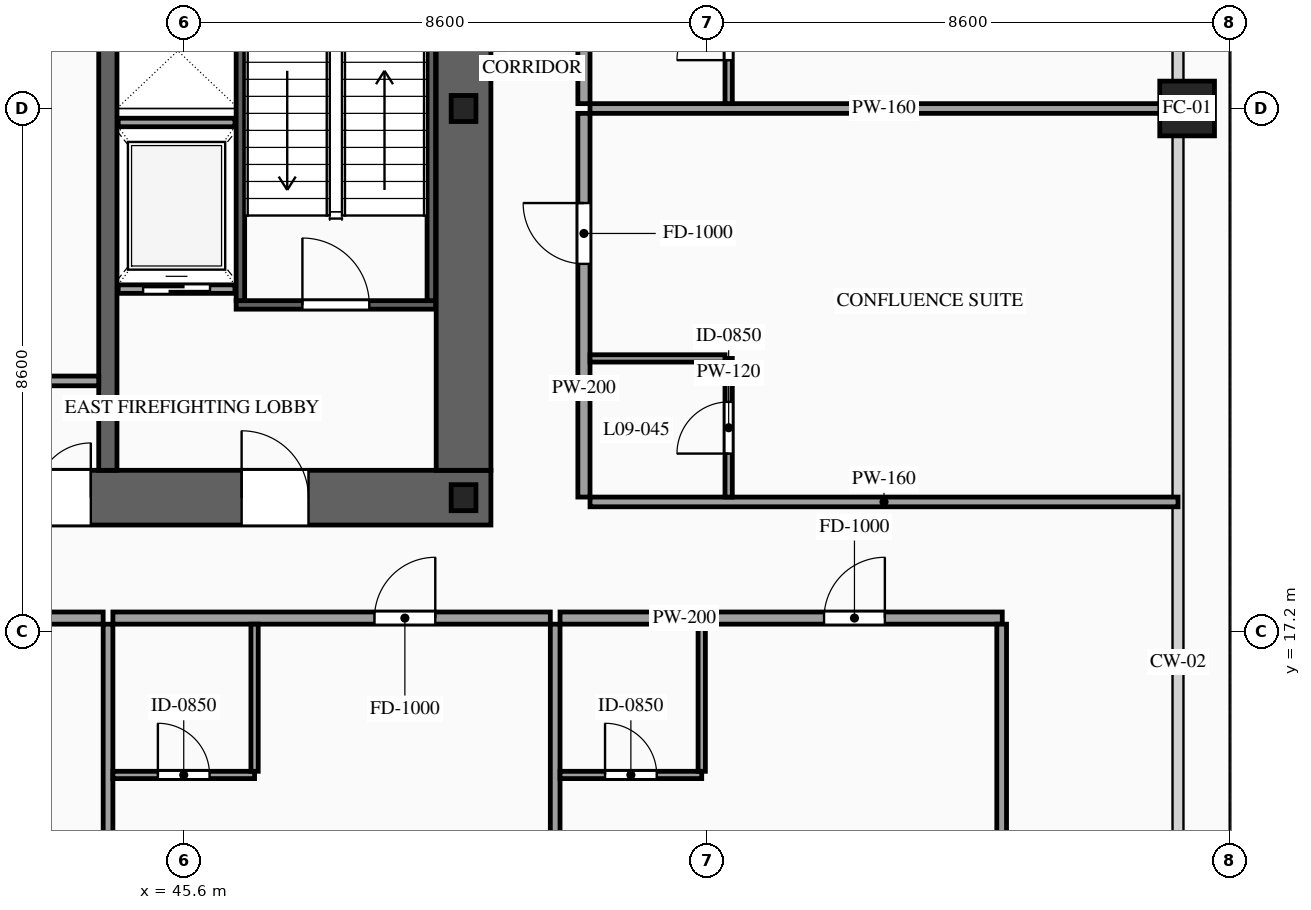
"""IFC4 building model, lengths in metres.
Left out: names, types, materials, properties, quantities, classifications, styles, units other than length and angle.
Written with IfcOpenShell. Run it as: python <this file> out.ifc"""

import sys

from ifc_helpers import new_model, si_unit, direction, frame, frame_2d, origin, origin_2d, place, context, subcontext, project, spatial, rectangle, hollow_rectangle, i_section, extrude, source, transform, mapped, element, fill, save


model = new_model("IFC4")
c1 = context("Model", 3, precision=1e-05, world=origin(), true_north=direction((0.0, 1.0)))
c2 = subcontext(c1, "Body", "Model", "MODEL_VIEW")
j1 = project(units=[si_unit("LENGTHUNIT", "METRE"), si_unit("PLANEANGLEUNIT", "RADIAN")], contexts=[c1])
p1 = place(None, origin())
s1 = spatial("IfcSite", under=j1, at=p1, CompositionType="ELEMENT")
p2 = place(p1, origin())
s2 = spatial("IfcBuilding", under=s1, at=p2, CompositionType="ELEMENT")
p3 = place(p2, frame((0.0, 0.0, 37.8)))
s3 = spatial("IfcBuildingStorey", under=s2, at=p3, CompositionType="ELEMENT", Elevation=37.8)
p4 = place(p3, frame((23.35, 19.4, 0.0), z_axis=(0.0, 0.0, 1.0), x_axis=(1.0, 0.0, 0.0)))
e1 = element("IfcWall", 1, at=p4, inside=s3, PredefinedType="SHEAR", context=c2, shape_type="SweptSolid", body=[
    extrude(rectangle(XDim=27.3, YDim=0.9, at=frame_2d((13.65, 0.0))), origin(), (0.0, 0.0, 1.0), 3.6),
])
p5 = place(p4, frame((2.1, 0.0, 0.0)))
e2 = element("IfcOpeningElement", 2, at=p5, cuts=e1, PredefinedType="OPENING", context=c2, shape_type="SweptSolid", body=[
    extrude(rectangle(XDim=1.1, YDim=2.2, at=frame_2d((0.55, 1.1))), frame((0.0, 0.465, 0.0), z_axis=(0.0, -1.0, 0.0), x_axis=(1.0, 0.0, 0.0)), (0.0, 0.0, 1.0), 0.93),
])
p6 = place(p4, frame((10.0, 0.0, 0.0)))
e3 = element("IfcOpeningElement", 3, at=p6, cuts=e1, PredefinedType="OPENING", context=c2, shape_type="SweptSolid", body=[
    extrude(rectangle(XDim=1.1, YDim=2.2, at=frame_2d((0.55, 1.1))), frame((0.0, 0.465, 0.0), z_axis=(0.0, -1.0, 0.0), x_axis=(1.0, 0.0, 0.0)), (0.0, 0.0, 1.0), 0.93),
])
p7 = place(p4, frame((23.2, 0.0, 0.0)))
e4 = element("IfcOpeningElement", 4, at=p7, cuts=e1, PredefinedType="OPENING", context=c2, shape_type="SweptSolid", body=[
    extrude(rectangle(XDim=1.1, YDim=2.2, at=frame_2d((0.55, 1.1))), frame((0.0, 0.465, 0.0), z_axis=(0.0, -1.0, 0.0), x_axis=(1.0, 0.0, 0.0)), (0.0, 0.0, 1.0), 0.93),
])
p8 = place(p4, frame((19.82, 0.0, 0.0)))
e5 = element("IfcOpeningElement", 5, at=p8, cuts=e1, PredefinedType="OPENING", context=c2, shape_type="SweptSolid", body=[
    extrude(rectangle(XDim=0.9, YDim=2.15, at=frame_2d((0.45, 1.075))), frame((0.0, 0.465, 0.0), z_axis=(0.0, -1.0, 0.0), x_axis=(1.0, 0.0, 0.0)), (0.0, 0.0, 1.0), 0.93),
])
p9 = place(p4, frame((18.38, 0.0, 0.0)))
e6 = element("IfcOpeningElement", 6, at=p9, cuts=e1, PredefinedType="OPENING", context=c2, shape_type="SweptSolid", body=[
    extrude(rectangle(XDim=0.9, YDim=2.15, at=frame_2d((0.45, 1.075))), frame((0.0, 0.465, 0.0), z_axis=(0.0, -1.0, 0.0), x_axis=(1.0, 0.0, 0.0)), (0.0, 0.0, 1.0), 0.93),
])
m1 = source(origin(), c2, "Body", "SweptSolid", [
    extrude(rectangle(XDim=11.9, YDim=0.9, at=frame_2d((5.95, 0.0))), origin(), (0.0, 0.0, 1.0), 3.6),
])
p10 = place(p3, frame((50.2, 19.85, 0.0), z_axis=(0.0, 0.0, 1.0), x_axis=(0.0, 1.0, 0.0)))
e7 = element("IfcWall", 7, at=p10, inside=s3, PredefinedType="SHEAR", context=c2, shape_type="MappedRepresentation", body=[
    mapped(m1, transform((0.0, 0.0, 0.0), scale=1.0)),
])
m2 = source(origin(), c2, "Body", "SweptSolid", [
    extrude(rectangle(XDim=11.9, YDim=0.3, at=frame_2d((5.95, 0.0))), origin(), (0.0, 0.0, 1.0), 3.6),
])
p11 = place(p3, frame((44.35, 19.85, 0.0), z_axis=(0.0, 0.0, 1.0), x_axis=(0.0, 1.0, 0.0)))
e8 = element("IfcWall", 8, at=p11, inside=s3, PredefinedType="SOLIDWALL", context=c2, shape_type="MappedRepresentation", body=[
    mapped(m2, transform((0.0, 0.0, 0.0), scale=1.0)),
])
m3 = source(origin(), c2, "Body", "SweptSolid", [
    extrude(i_section(OverallWidth=0.407, OverallDepth=0.428, WebThickness=0.02, FlangeThickness=0.035, at=origin_2d()), origin(), (0.0, 0.0, 1.0), 3.6),
])
for number, where, z_axis, x_axis in (
    (9, (50.2, 19.4, 0.0), (0.0, 0.0, 1.0), (1.0, 0.0, 0.0)),
    (10, (50.2, 25.8, 0.0), (0.0, 0.0, 1.0), (1.0, 0.0, 0.0)),
):
    element("IfcColumn", number, at=place(p3, frame(where, z_axis=z_axis, x_axis=x_axis)), inside=s3, PredefinedType="COLUMN", context=c2, shape_type="MappedRepresentation", body=[
        mapped(m3, transform((0.0, 0.0, 0.0), scale=1.0)),
    ])
m4 = source(origin(), c2, "Body", "SweptSolid", [
    extrude(hollow_rectangle(XDim=0.9, YDim=0.9, WallThickness=0.042, at=origin_2d()), origin(), (0.0, 0.0, 1.0), 3.6),
])
p12 = place(p3, frame((62.1, 25.8, 0.0), z_axis=(0.0, 0.0, 1.0), x_axis=(1.0, 0.0, 0.0)))
e11 = element("IfcColumn", 11, at=p12, inside=s3, PredefinedType="COLUMN", context=c2, shape_type="MappedRepresentation", body=[
    mapped(m4, transform((0.0, 0.0, 0.0), scale=1.0)),
])
p13 = place(p3, frame((44.52, 22.83, 0.0), z_axis=(0.0, 0.0, 1.0), x_axis=(1.0, 0.0, 0.0)))
e12 = element("IfcWall", 12, at=p13, inside=s3, PredefinedType="SOLIDWALL", context=c2, shape_type="SweptSolid", body=[
    extrude(rectangle(XDim=1.92, YDim=0.14, at=frame_2d((0.96, 0.0))), origin(), (0.0, 0.0, 1.0), 3.32),
])
p14 = place(p13, frame((0.41, 0.0, 0.0)))
e13 = element("IfcOpeningElement", 13, at=p14, cuts=e12, PredefinedType="OPENING", context=c2, shape_type="SweptSolid", body=[
    extrude(rectangle(XDim=1.1, YDim=2.2, at=frame_2d((0.55, 1.1))), frame((0.0, 0.085, 0.0), z_axis=(0.0, -1.0, 0.0), x_axis=(1.0, 0.0, 0.0)), (0.0, 0.0, 1.0), 0.17),
])
m5 = source(origin(), c2, "Body", "SweptSolid", [
    extrude(rectangle(XDim=1.92, YDim=0.14, at=frame_2d((0.96, 0.0))), origin(), (0.0, 0.0, 1.0), 3.32),
])
p15 = place(p3, frame((44.52, 25.57, 0.0), z_axis=(0.0, 0.0, 1.0), x_axis=(1.0, 0.0, 0.0)))
e14 = element("IfcWall", 14, at=p15, inside=s3, PredefinedType="SOLIDWALL", context=c2, shape_type="MappedRepresentation", body=[
    mapped(m5, transform((0.0, 0.0, 0.0), scale=1.0)),
])
p16 = place(p3, frame((46.46, 22.57, 0.0), z_axis=(0.0, 0.0, 1.0), x_axis=(1.0, 0.0, 0.0)))
e15 = element("IfcWall", 15, at=p16, inside=s3, PredefinedType="SOLIDWALL", context=c2, shape_type="SweptSolid", body=[
    extrude(rectangle(XDim=3.28, YDim=0.14, at=frame_2d((1.64, 0.0))), origin(), (0.0, 0.0, 1.0), 3.32),
])
p17 = place(p16, frame((1.09, 0.0, 0.0)))
e16 = element("IfcOpeningElement", 16, at=p17, cuts=e15, PredefinedType="OPENING", context=c2, shape_type="SweptSolid", body=[
    extrude(rectangle(XDim=1.1, YDim=2.2, at=frame_2d((0.55, 1.1))), frame((0.0, 0.085, 0.0), z_axis=(0.0, -1.0, 0.0), x_axis=(1.0, 0.0, 0.0)), (0.0, 0.0, 1.0), 0.17),
])
m6 = source(origin(), c2, "Body", "SweptSolid", [
    extrude(rectangle(XDim=8.94, YDim=0.14, at=frame_2d((4.47, 0.0))), origin(), (0.0, 0.0, 1.0), 3.32),
])
for number, where, z_axis, x_axis in (
    (17, (46.53, 22.64, 0.0), (0.0, 0.0, 1.0), (0.0, 1.0, 0.0)),
    (18, (49.67, 22.64, 0.0), (0.0, 0.0, 1.0), (0.0, 1.0, 0.0)),
):
    element("IfcWall", number, at=place(p3, frame(where, z_axis=z_axis, x_axis=x_axis)), inside=s3, PredefinedType="SOLIDWALL", context=c2, shape_type="MappedRepresentation", body=[
        mapped(m6, transform((0.0, 0.0, 0.0), scale=1.0)),
    ])
m7 = source(origin(), c2, "Body", "SweptSolid", [
    extrude(rectangle(XDim=1.17, YDim=0.16, at=frame_2d((0.585, 0.0))), origin(), (0.0, 0.0, 1.0), 3.32),
])
p18 = place(p3, frame((43.03, 21.32, 0.0), z_axis=(0.0, 0.0, 1.0), x_axis=(1.0, 0.0, 0.0)))
e19 = element("IfcWall", 19, at=p18, inside=s3, PredefinedType="PARTITIONING", context=c2, shape_type="MappedRepresentation", body=[
    mapped(m7, transform((0.0, 0.0, 0.0), scale=1.0)),
])
p19 = place(p3, frame((37.08, 17.42, 0.0), z_axis=(0.0, 0.0, 1.0), x_axis=(1.0, 0.0, 0.0)))
e20 = element("IfcWall", 20, at=p19, inside=s3, PredefinedType="PARTITIONING", context=c2, shape_type="SweptSolid", body=[
    extrude(rectangle(XDim=7.193, YDim=0.2, at=frame_2d((3.596, 0.0))), origin(), (0.0, 0.0, 1.0), 3.32),
])
p20 = place(p19, frame((4.302, 0.0, 0.0)))
e21 = element("IfcOpeningElement", 21, at=p20, cuts=e20, PredefinedType="OPENING", context=c2, shape_type="SweptSolid", body=[
    extrude(rectangle(XDim=1.0, YDim=2.2, at=frame_2d((0.5, 1.1))), frame((0.0, 0.115, 0.0), z_axis=(0.0, -1.0, 0.0), x_axis=(1.0, 0.0, 0.0)), (0.0, 0.0, 1.0), 0.23),
])
m8 = source(origin(), c2, "Body", "SweptSolid", [
    extrude(rectangle(XDim=16.47, YDim=0.16, at=frame_2d((8.235, 0.0))), origin(), (0.0, 0.0, 1.0), 3.32),
])
p21 = place(p3, frame((44.353, 0.85, 0.0), z_axis=(0.0, 0.0, 1.0), x_axis=(0.0, 1.0, 0.0)))
e22 = element("IfcWall", 22, at=p21, inside=s3, PredefinedType="PARTITIONING", context=c2, shape_type="MappedRepresentation", body=[
    mapped(m8, transform((0.0, 0.0, 0.0), scale=1.0)),
])
p22 = place(p3, frame((44.433, 17.42, 0.0), z_axis=(0.0, 0.0, 1.0), x_axis=(1.0, 0.0, 0.0)))
e23 = element("IfcWall", 23, at=p22, inside=s3, PredefinedType="PARTITIONING", context=c2, shape_type="SweptSolid", body=[
    extrude(rectangle(XDim=7.194, YDim=0.2, at=frame_2d((3.597, 0.0))), origin(), (0.0, 0.0, 1.0), 3.32),
])
p23 = place(p22, frame((4.302, 0.0, 0.0)))
e24 = element("IfcOpeningElement", 24, at=p23, cuts=e23, PredefinedType="OPENING", context=c2, shape_type="SweptSolid", body=[
    extrude(rectangle(XDim=1.0, YDim=2.2, at=frame_2d((0.5, 1.1))), frame((0.0, 0.115, 0.0), z_axis=(0.0, -1.0, 0.0), x_axis=(1.0, 0.0, 0.0)), (0.0, 0.0, 1.0), 0.23),
])
p24 = place(p3, frame((51.707, 0.85, 0.0), z_axis=(0.0, 0.0, 1.0), x_axis=(0.0, 1.0, 0.0)))
e25 = element("IfcWall", 25, at=p24, inside=s3, PredefinedType="PARTITIONING", context=c2, shape_type="MappedRepresentation", body=[
    mapped(m8, transform((0.0, 0.0, 0.0), scale=1.0)),
])
p25 = place(p3, frame((44.433, 14.84, 0.0), z_axis=(0.0, 0.0, 1.0), x_axis=(1.0, 0.0, 0.0)))
e26 = element("IfcWall", 26, at=p25, inside=s3, PredefinedType="PARTITIONING", context=c2, shape_type="SweptSolid", body=[
    extrude(rectangle(XDim=2.33, YDim=0.12, at=frame_2d((1.165, 0.0))), origin(), (0.0, 0.0, 1.0), 3.32),
])
p26 = place(p25, frame((0.74, 0.0, 0.0)))
e27 = element("IfcOpeningElement", 27, at=p26, cuts=e26, PredefinedType="OPENING", context=c2, shape_type="SweptSolid", body=[
    extrude(rectangle(XDim=0.85, YDim=2.1, at=frame_2d((0.425, 1.05))), frame((0.0, 0.075, 0.0), z_axis=(0.0, -1.0, 0.0), x_axis=(1.0, 0.0, 0.0)), (0.0, 0.0, 1.0), 0.15),
])
m9 = source(origin(), c2, "Body", "SweptSolid", [
    extrude(rectangle(XDim=2.42, YDim=0.12, at=frame_2d((1.21, 0.0))), origin(), (0.0, 0.0, 1.0), 3.32),
])
p27 = place(p3, frame((46.763, 14.9, 0.0), z_axis=(0.0, 0.0, 1.0), x_axis=(0.0, 1.0, 0.0)))
e28 = element("IfcWall", 28, at=p27, inside=s3, PredefinedType="PARTITIONING", context=c2, shape_type="MappedRepresentation", body=[
    mapped(m9, transform((0.0, 0.0, 0.0), scale=1.0)),
])
p28 = place(p3, frame((51.787, 17.42, 0.0), z_axis=(0.0, 0.0, 1.0), x_axis=(1.0, 0.0, 0.0)))
e29 = element("IfcWall", 29, at=p28, inside=s3, PredefinedType="PARTITIONING", context=c2, shape_type="SweptSolid", body=[
    extrude(rectangle(XDim=7.273, YDim=0.2, at=frame_2d((3.636, 0.0))), origin(), (0.0, 0.0, 1.0), 3.32),
])
p29 = place(p28, frame((4.342, 0.0, 0.0)))
e30 = element("IfcOpeningElement", 30, at=p29, cuts=e29, PredefinedType="OPENING", context=c2, shape_type="SweptSolid", body=[
    extrude(rectangle(XDim=1.0, YDim=2.2, at=frame_2d((0.5, 1.1))), frame((0.0, 0.115, 0.0), z_axis=(0.0, -1.0, 0.0), x_axis=(1.0, 0.0, 0.0)), (0.0, 0.0, 1.0), 0.23),
])
m10 = source(origin(), c2, "Body", "SweptSolid", [
    extrude(rectangle(XDim=16.32, YDim=0.16, at=frame_2d((8.16, 0.0))), origin(), (0.0, 0.0, 1.0), 3.32),
])
p30 = place(p3, frame((59.05, 1.0, 0.0), z_axis=(0.0, 0.0, 1.0), x_axis=(0.0, 1.0, 0.0)))
e31 = element("IfcWall", 31, at=p30, inside=s3, PredefinedType="PARTITIONING", context=c2, shape_type="MappedRepresentation", body=[
    mapped(m10, transform((0.0, 0.0, 0.0), scale=1.0)),
])
p31 = place(p3, frame((51.787, 14.84, 0.0), z_axis=(0.0, 0.0, 1.0), x_axis=(1.0, 0.0, 0.0)))
e32 = element("IfcWall", 32, at=p31, inside=s3, PredefinedType="PARTITIONING", context=c2, shape_type="SweptSolid", body=[
    extrude(rectangle(XDim=2.33, YDim=0.12, at=frame_2d((1.165, 0.0))), origin(), (0.0, 0.0, 1.0), 3.32),
])
p32 = place(p31, frame((0.74, 0.0, 0.0)))
e33 = element("IfcOpeningElement", 33, at=p32, cuts=e32, PredefinedType="OPENING", context=c2, shape_type="SweptSolid", body=[
    extrude(rectangle(XDim=0.85, YDim=2.1, at=frame_2d((0.425, 1.05))), frame((0.0, 0.075, 0.0), z_axis=(0.0, -1.0, 0.0), x_axis=(1.0, 0.0, 0.0)), (0.0, 0.0, 1.0), 0.15),
])
p33 = place(p3, frame((54.117, 14.9, 0.0), z_axis=(0.0, 0.0, 1.0), x_axis=(0.0, 1.0, 0.0)))
e34 = element("IfcWall", 34, at=p33, inside=s3, PredefinedType="PARTITIONING", context=c2, shape_type="MappedRepresentation", body=[
    mapped(m9, transform((0.0, 0.0, 0.0), scale=1.0)),
])
p34 = place(p3, frame((52.18, 19.41, 0.0), z_axis=(0.0, 0.0, 1.0), x_axis=(0.0, 1.0, 0.0)))
e35 = element("IfcWall", 35, at=p34, inside=s3, PredefinedType="PARTITIONING", context=c2, shape_type="SweptSolid", body=[
    extrude(rectangle(XDim=6.31, YDim=0.2, at=frame_2d((3.155, 0.0))), origin(), (0.0, 0.0, 1.0), 3.32),
])
p35 = place(p34, frame((3.835, 0.0, 0.0)))
e36 = element("IfcOpeningElement", 36, at=p35, cuts=e35, PredefinedType="OPENING", context=c2, shape_type="SweptSolid", body=[
    extrude(rectangle(XDim=1.0, YDim=2.2, at=frame_2d((0.5, 1.1))), frame((0.0, 0.115, 0.0), z_axis=(0.0, -1.0, 0.0), x_axis=(1.0, 0.0, 0.0)), (0.0, 0.0, 1.0), 0.23),
])
m11 = source(origin(), c2, "Body", "SweptSolid", [
    extrude(rectangle(XDim=9.67, YDim=0.16, at=frame_2d((4.835, 0.0))), origin(), (0.0, 0.0, 1.0), 2.515),
])
p36 = place(p3, frame((52.28, 25.8, 0.0), z_axis=(0.0, 0.0, 1.0), x_axis=(1.0, 0.0, 0.0)))
e37 = element("IfcWall", 37, at=p36, inside=s3, PredefinedType="PARTITIONING", context=c2, shape_type="MappedRepresentation", body=[
    mapped(m11, transform((0.0, 0.0, 0.0), scale=1.0)),
])
m12 = source(origin(), c2, "Body", "SweptSolid", [
    extrude(rectangle(XDim=9.67, YDim=0.16, at=frame_2d((4.835, 0.0))), origin(), (0.0, 0.0, 1.0), 2.815),
])
p37 = place(p3, frame((52.28, 19.33, 0.0), z_axis=(0.0, 0.0, 1.0), x_axis=(1.0, 0.0, 0.0)))
e38 = element("IfcWall", 38, at=p37, inside=s3, PredefinedType="PARTITIONING", context=c2, shape_type="MappedRepresentation", body=[
    mapped(m12, transform((0.0, 0.0, 0.0), scale=1.0)),
])
p38 = place(p3, frame((54.56, 19.41, 0.0), z_axis=(0.0, 0.0, 1.0), x_axis=(0.0, 1.0, 0.0)))
e39 = element("IfcWall", 39, at=p38, inside=s3, PredefinedType="PARTITIONING", context=c2, shape_type="SweptSolid", body=[
    extrude(rectangle(XDim=2.28, YDim=0.12, at=frame_2d((1.14, 0.0))), origin(), (0.0, 0.0, 1.0), 3.32),
])
p39 = place(p38, frame((0.715, 0.0, 0.0)))
e40 = element("IfcOpeningElement", 40, at=p39, cuts=e39, PredefinedType="OPENING", context=c2, shape_type="SweptSolid", body=[
    extrude(rectangle(XDim=0.85, YDim=2.1, at=frame_2d((0.425, 1.05))), frame((0.0, 0.075, 0.0), z_axis=(0.0, -1.0, 0.0), x_axis=(1.0, 0.0, 0.0)), (0.0, 0.0, 1.0), 0.15),
])
m13 = source(origin(), c2, "Body", "SweptSolid", [
    extrude(rectangle(XDim=2.22, YDim=0.12, at=frame_2d((1.11, 0.0))), origin(), (0.0, 0.0, 1.0), 3.32),
])
p40 = place(p3, frame((52.28, 21.69, 0.0), z_axis=(0.0, 0.0, 1.0), x_axis=(1.0, 0.0, 0.0)))
e41 = element("IfcWall", 41, at=p40, inside=s3, PredefinedType="PARTITIONING", context=c2, shape_type="MappedRepresentation", body=[
    mapped(m13, transform((0.0, 0.0, 0.0), scale=1.0)),
])
p41 = place(p3, frame((52.18, 25.88, 0.0), z_axis=(0.0, 0.0, 1.0), x_axis=(0.0, 1.0, 0.0)))
e42 = element("IfcWall", 42, at=p41, inside=s3, PredefinedType="PARTITIONING", context=c2, shape_type="SweptSolid", body=[
    extrude(rectangle(XDim=6.31, YDim=0.2, at=frame_2d((3.155, 0.0))), origin(), (0.0, 0.0, 1.0), 3.32),
])
p42 = place(p41, frame((3.835, 0.0, 0.0)))
e43 = element("IfcOpeningElement", 43, at=p42, cuts=e42, PredefinedType="OPENING", context=c2, shape_type="SweptSolid", body=[
    extrude(rectangle(XDim=1.0, YDim=2.2, at=frame_2d((0.5, 1.1))), frame((0.0, 0.115, 0.0), z_axis=(0.0, -1.0, 0.0), x_axis=(1.0, 0.0, 0.0)), (0.0, 0.0, 1.0), 0.23),
])
p43 = place(p3, frame((54.56, 25.88, 0.0), z_axis=(0.0, 0.0, 1.0), x_axis=(0.0, 1.0, 0.0)))
e44 = element("IfcWall", 44, at=p43, inside=s3, PredefinedType="PARTITIONING", context=c2, shape_type="SweptSolid", body=[
    extrude(rectangle(XDim=2.28, YDim=0.12, at=frame_2d((1.14, 0.0))), origin(), (0.0, 0.0, 1.0), 3.32),
])
p44 = place(p43, frame((0.715, 0.0, 0.0)))
e45 = element("IfcOpeningElement", 45, at=p44, cuts=e44, PredefinedType="OPENING", context=c2, shape_type="SweptSolid", body=[
    extrude(rectangle(XDim=0.85, YDim=2.1, at=frame_2d((0.425, 1.05))), frame((0.0, 0.075, 0.0), z_axis=(0.0, -1.0, 0.0), x_axis=(1.0, 0.0, 0.0)), (0.0, 0.0, 1.0), 0.15),
])
m14 = source(origin(), c2, "Body", "SweptSolid", [
    extrude(rectangle(XDim=1.1, YDim=2.2, at=frame_2d((0.55, 1.1))), frame((0.0, 0.025, 0.0), z_axis=(0.0, -1.0, 0.0), x_axis=(1.0, 0.0, 0.0)), (0.0, 0.0, 1.0), 0.05),
])
p45 = place(p14, origin())
e46 = element("IfcDoor", 46, at=p45, inside=s3, OperationType="SLIDING_TO_RIGHT", PredefinedType="DOOR", context=c2, shape_type="MappedRepresentation", body=[
    mapped(m14, transform((0.0, 0.0, 0.0), scale=1.0)),
])
fill(e13, e46)
m15 = source(origin(), c2, "Body", "SweptSolid", [
    extrude(rectangle(XDim=1.1, YDim=2.2, at=frame_2d((0.55, 1.1))), frame((0.0, 0.025, 0.0), z_axis=(0.0, -1.0, 0.0), x_axis=(1.0, 0.0, 0.0)), (0.0, 0.0, 1.0), 0.05),
])
p46 = place(p17, origin())
e47 = element("IfcDoor", 47, at=p46, inside=s3, OperationType="SINGLE_SWING_LEFT", PredefinedType="DOOR", context=c2, shape_type="MappedRepresentation", body=[
    mapped(m15, transform((0.0, 0.0, 0.0), scale=1.0)),
])
fill(e16, e47)
p47 = place(p7, origin())
e48 = element("IfcDoor", 48, at=p47, inside=s3, OperationType="SINGLE_SWING_LEFT", PredefinedType="DOOR", context=c2, shape_type="MappedRepresentation", body=[
    mapped(m15, transform((0.0, 0.0, 0.0), scale=1.0)),
])
fill(e4, e48)
m16 = source(origin(), c2, "Body", "SweptSolid", [
    extrude(rectangle(XDim=0.9, YDim=2.15, at=frame_2d((0.45, 1.075))), frame((0.0, 0.025, 0.0), z_axis=(0.0, -1.0, 0.0), x_axis=(1.0, 0.0, 0.0)), (0.0, 0.0, 1.0), 0.05),
])
p48 = place(p8, origin())
e49 = element("IfcDoor", 49, at=p48, inside=s3, OperationType="SINGLE_SWING_RIGHT", PredefinedType="DOOR", context=c2, shape_type="MappedRepresentation", body=[
    mapped(m16, transform((0.0, 0.0, 0.0), scale=1.0)),
])
fill(e5, e49)
m17 = source(origin(), c2, "Body", "SweptSolid", [
    extrude(rectangle(XDim=1.0, YDim=2.2, at=frame_2d((0.5, 1.1))), frame((0.0, 0.025, 0.0), z_axis=(0.0, -1.0, 0.0), x_axis=(1.0, 0.0, 0.0)), (0.0, 0.0, 1.0), 0.05),
])
p49 = place(p23, origin())
e50 = element("IfcDoor", 50, at=p49, inside=s3, OperationType="SINGLE_SWING_RIGHT", PredefinedType="DOOR", context=c2, shape_type="MappedRepresentation", body=[
    mapped(m17, transform((0.0, 0.0, 0.0), scale=1.0)),
])
fill(e24, e50)
m18 = source(origin(), c2, "Body", "SweptSolid", [
    extrude(rectangle(XDim=0.85, YDim=2.1, at=frame_2d((0.425, 1.05))), frame((0.0, 0.025, 0.0), z_axis=(0.0, -1.0, 0.0), x_axis=(1.0, 0.0, 0.0)), (0.0, 0.0, 1.0), 0.05),
])
p50 = place(p26, origin())
e51 = element("IfcDoor", 51, at=p50, inside=s3, OperationType="SINGLE_SWING_LEFT", PredefinedType="DOOR", context=c2, shape_type="MappedRepresentation", body=[
    mapped(m18, transform((0.0, 0.0, 0.0), scale=1.0)),
])
fill(e27, e51)
p51 = place(p29, origin())
e52 = element("IfcDoor", 52, at=p51, inside=s3, OperationType="SINGLE_SWING_RIGHT", PredefinedType="DOOR", context=c2, shape_type="MappedRepresentation", body=[
    mapped(m17, transform((0.0, 0.0, 0.0), scale=1.0)),
])
fill(e30, e52)
p52 = place(p32, origin())
e53 = element("IfcDoor", 53, at=p52, inside=s3, OperationType="SINGLE_SWING_LEFT", PredefinedType="DOOR", context=c2, shape_type="MappedRepresentation", body=[
    mapped(m18, transform((0.0, 0.0, 0.0), scale=1.0)),
])
fill(e33, e53)
p53 = place(p35, origin())
e54 = element("IfcDoor", 54, at=p53, inside=s3, OperationType="SINGLE_SWING_RIGHT", PredefinedType="DOOR", context=c2, shape_type="MappedRepresentation", body=[
    mapped(m17, transform((0.0, 0.0, 0.0), scale=1.0)),
])
fill(e36, e54)
p54 = place(p39, origin())
e55 = element("IfcDoor", 55, at=p54, inside=s3, OperationType="SINGLE_SWING_LEFT", PredefinedType="DOOR", context=c2, shape_type="MappedRepresentation", body=[
    mapped(m18, transform((0.0, 0.0, 0.0), scale=1.0)),
])
fill(e40, e55)
p55 = place(p44, origin())
e56 = element("IfcDoor", 56, at=p55, inside=s3, OperationType="SINGLE_SWING_LEFT", PredefinedType="DOOR", context=c2, shape_type="MappedRepresentation", body=[
    mapped(m18, transform((0.0, 0.0, 0.0), scale=1.0)),
])
fill(e45, e56)
save(model, sys.argv[1])
